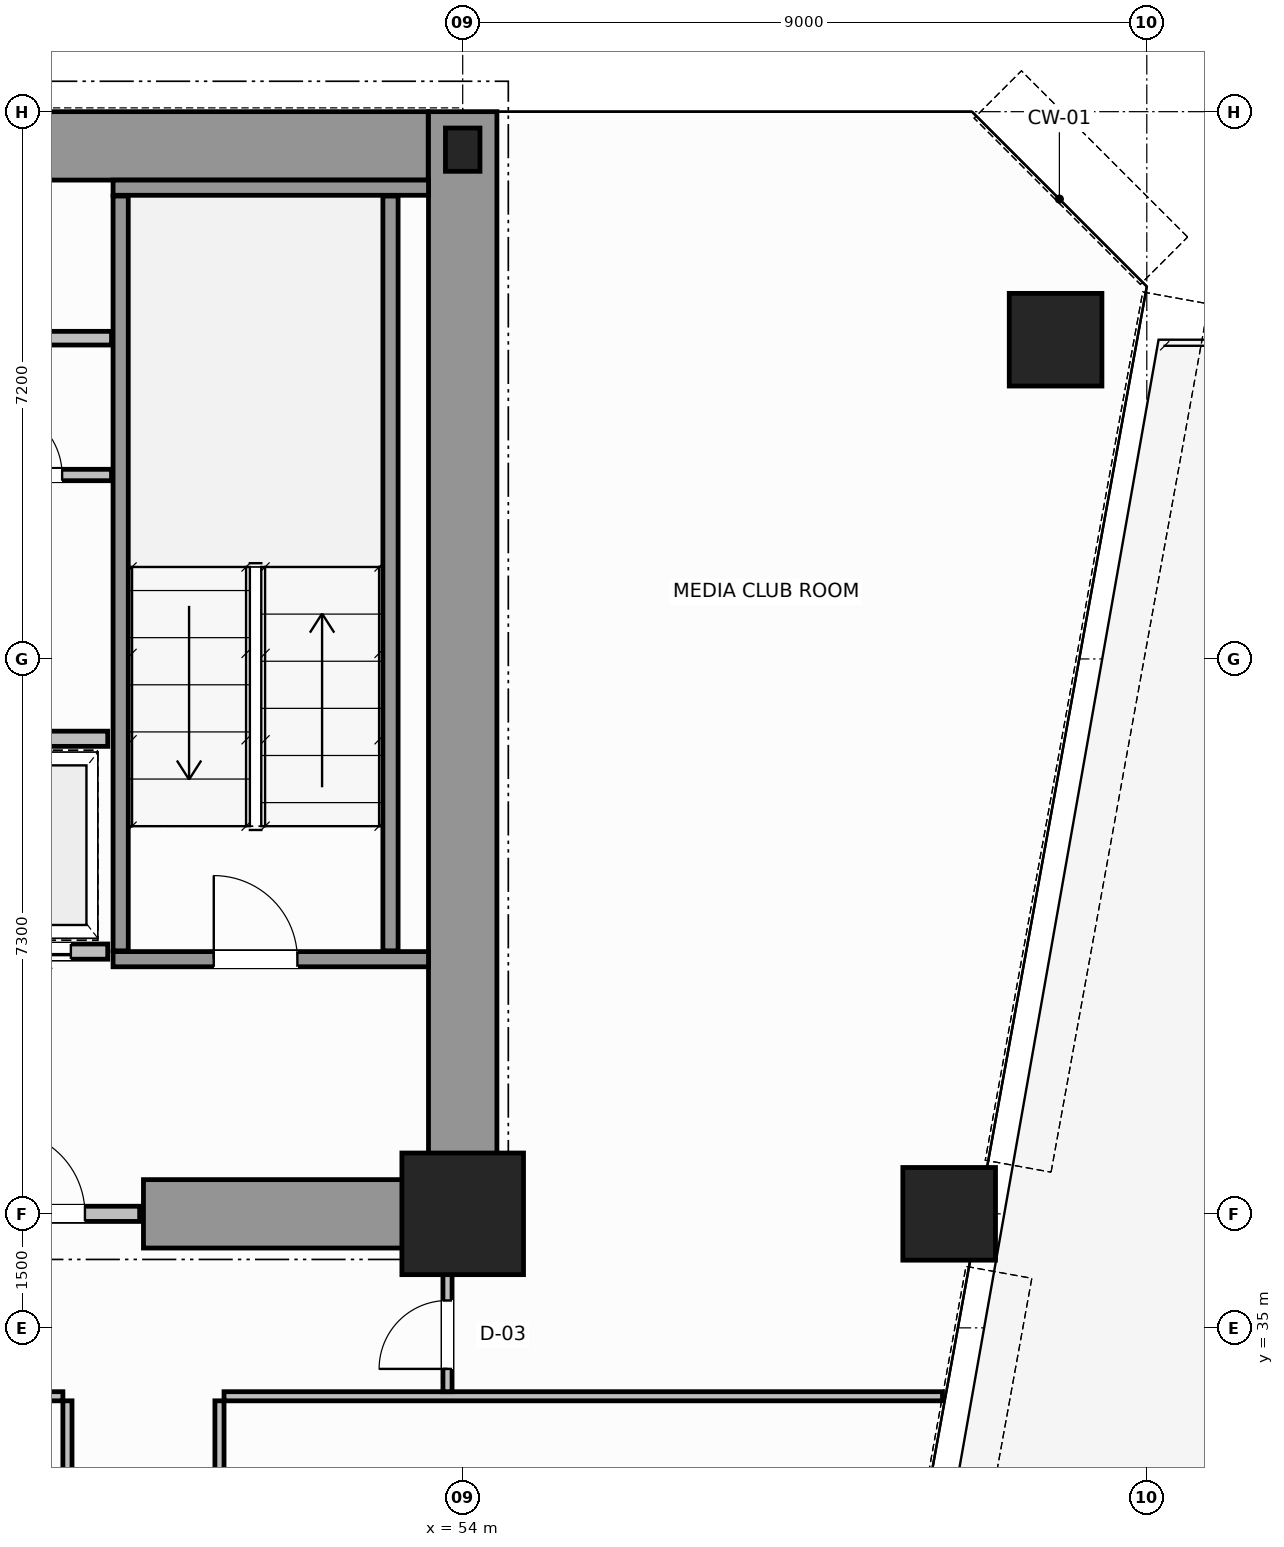
"""IFC4 building model, lengths in metres.
Left out: names, types, materials, properties, quantities, classifications, styles, units other than length and angle.
Written with IfcOpenShell. Run it as: python <this file> out.ifc"""

import sys

from ifc_helpers import new_model, si_unit, direction, frame, frame_2d, origin, origin_2d, place, context, subcontext, project, spatial, rectangle, hollow_circle, i_section, extrude, source, transform, mapped, element, fill, save


model = new_model("IFC4")
c1 = context("Model", 3, precision=1e-05, world=origin(), true_north=direction((0.0, 1.0)))
c2 = subcontext(c1, "Body", "Model", "MODEL_VIEW")
j1 = project(units=[si_unit("LENGTHUNIT", "METRE"), si_unit("PLANEANGLEUNIT", "RADIAN")], contexts=[c1])
p1 = place(None, origin())
s1 = spatial("IfcSite", under=j1, at=p1, CompositionType="ELEMENT")
p2 = place(p1, origin())
s2 = spatial("IfcBuilding", under=s1, at=p2, CompositionType="ELEMENT")
p3 = place(p2, frame((0.0, 0.0, 18.8)))
s3 = spatial("IfcBuildingStorey", under=s2, at=p3, CompositionType="ELEMENT", Elevation=18.8)
m1 = source(origin(), c2, "Body", "SweptSolid", [
    extrude(rectangle(XDim=1.6, YDim=1.6, at=origin_2d()), origin(), (0.0, 0.0, 1.0), 3.8),
])
p4 = place(p3, frame((54.0, 36.5, 0.0), z_axis=(0.0, 0.0, 1.0), x_axis=(1.0, 0.0, 0.0)))
e1 = element("IfcColumn", 1, at=p4, inside=s3, PredefinedType="COLUMN", context=c2, shape_type="MappedRepresentation", body=[
    mapped(m1, transform((0.0, 0.0, 0.0), scale=1.0)),
])
m2 = source(origin(), c2, "Body", "SweptSolid", [
    extrude(i_section(OverallWidth=0.454, OverallDepth=0.569, WebThickness=0.078, FlangeThickness=0.08, FilletRadius=0.015, at=origin_2d()), origin(), (0.0, 0.0, 1.0), 3.8),
])
p5 = place(p3, frame((54.0, 50.5, 0.0), z_axis=(0.0, 0.0, 1.0), x_axis=(1.0, 0.0, 0.0)))
e2 = element("IfcColumn", 2, at=p5, inside=s3, PredefinedType="COLUMN", context=c2, shape_type="MappedRepresentation", body=[
    mapped(m2, transform((0.0, 0.0, 0.0), scale=1.0)),
])
m3 = source(origin(), c2, "Body", "SweptSolid", [
    extrude(hollow_circle(Radius=0.61, WallThickness=0.05, at=origin_2d()), origin(), (0.0, 0.0, 1.0), 3.8),
])
for number, where, z_axis, x_axis in (
    (3, (61.8, 48.0, 0.0), (0.0, 0.0, 1.0), (1.0, 0.0, 0.0)),
    (4, (60.4, 36.5, 0.0), (0.0, 0.0, 1.0), (1.0, 0.0, 0.0)),
):
    element("IfcColumn", number, at=place(p3, frame(where, z_axis=z_axis, x_axis=x_axis)), inside=s3, PredefinedType="COLUMN", context=c2, shape_type="MappedRepresentation", body=[
        mapped(m3, transform((0.0, 0.0, 0.0), scale=1.0)),
    ])
p6 = place(p3, frame((34.002, 50.55, 0.0), z_axis=(0.0, 0.0, 1.0), x_axis=(1.0, 0.0, 0.0)))
e5 = element("IfcWall", 5, at=p6, inside=s3, PredefinedType="SHEAR", context=c2, shape_type="SweptSolid", body=[
    extrude(rectangle(XDim=19.544, YDim=0.9, at=frame_2d((9.772, 0.0))), origin(), (0.0, 0.0, 1.0), 3.8),
])
p7 = place(p3, frame((54.0, 36.5, 0.0), z_axis=(0.0, 0.0, 1.0), x_axis=(0.0, 1.0, 0.0)))
e6 = element("IfcWall", 6, at=p7, inside=s3, PredefinedType="SHEAR", context=c2, shape_type="SweptSolid", body=[
    extrude(rectangle(XDim=14.5, YDim=0.9, at=frame_2d((7.25, 0.0))), origin(), (0.0, 0.0, 1.0), 3.8),
])
p8 = place(p3, frame((49.8, 36.5, 0.0), z_axis=(0.0, 0.0, 1.0), x_axis=(1.0, 0.0, 0.0)))
e7 = element("IfcWall", 7, at=p8, inside=s3, PredefinedType="SHEAR", context=c2, shape_type="SweptSolid", body=[
    extrude(rectangle(XDim=3.73, YDim=0.9, at=frame_2d((1.865, 0.0))), origin(), (0.0, 0.0, 1.0), 2.38),
])
p9 = place(p3, frame((49.4, 39.85, 0.0), z_axis=(0.0, 0.0, 1.0), x_axis=(1.0, 0.0, 0.0)))
e8 = element("IfcWall", 8, at=p9, inside=s3, PredefinedType="SOLIDWALL", context=c2, shape_type="SweptSolid", body=[
    extrude(rectangle(XDim=4.15, YDim=0.2, at=frame_2d((2.075, 0.0))), origin(), (0.0, 0.0, 1.0), 3.8),
])
p10 = place(p9, frame((1.325, 0.0, 0.0)))
e9 = element("IfcOpeningElement", 9, at=p10, cuts=e8, PredefinedType="OPENING", context=c2, shape_type="SweptSolid", body=[
    extrude(rectangle(XDim=1.1, YDim=2.15, at=frame_2d((0.55, 1.075))), frame((0.0, 0.11, 0.0), z_axis=(0.0, -1.0, 0.0), x_axis=(1.0, 0.0, 0.0)), (0.0, 0.0, 1.0), 0.22),
])
p11 = place(p3, frame((49.4, 50.0, 0.0), z_axis=(0.0, 0.0, 1.0), x_axis=(1.0, 0.0, 0.0)))
e10 = element("IfcWall", 10, at=p11, inside=s3, PredefinedType="SOLIDWALL", context=c2, shape_type="SweptSolid", body=[
    extrude(rectangle(XDim=4.15, YDim=0.2, at=frame_2d((2.075, 0.0))), origin(), (0.0, 0.0, 1.0), 3.8),
])
for number, where, z_axis, x_axis in (
    (11, (49.5, 39.96, 0.0), (0.0, 0.0, 1.0), (0.0, 1.0, 0.0)),
    (12, (53.05, 39.96, 0.0), (0.0, 0.0, 1.0), (0.0, 1.0, 0.0)),
):
    element("IfcWall", number, at=place(p3, frame(where, z_axis=z_axis, x_axis=x_axis)), inside=s3, PredefinedType="SOLIDWALL", context=c2, shape_type="SweptSolid", body=[
        extrude(rectangle(XDim=9.93, YDim=0.2, at=frame_2d((4.965, 0.0))), origin(), (0.0, 0.0, 1.0), 3.8),
    ])
p12 = place(p3, frame((47.28, 36.5, 0.0), z_axis=(0.0, 0.0, 1.0), x_axis=(1.0, 0.0, 0.0)))
e13 = element("IfcWall", 13, at=p12, inside=s3, PredefinedType="SOLIDWALL", context=c2, shape_type="SweptSolid", body=[
    extrude(rectangle(XDim=2.47, YDim=0.2, at=frame_2d((1.235, 0.0))), origin(), (0.0, 0.0, 1.0), 2.37),
])
p13 = place(p12, frame((0.65, 0.0, 0.0)))
e14 = element("IfcOpeningElement", 14, at=p13, cuts=e13, PredefinedType="OPENING", context=c2, shape_type="SweptSolid", body=[
    extrude(rectangle(XDim=1.1, YDim=2.15, at=frame_2d((0.55, 1.075))), frame((0.0, 0.11, 0.0), z_axis=(0.0, -1.0, 0.0), x_axis=(1.0, 0.0, 0.0)), (0.0, 0.0, 1.0), 0.22),
])
p14 = place(p3, frame((47.26, 39.95, 0.0), z_axis=(0.0, 0.0, 1.0), x_axis=(1.0, 0.0, 0.0)))
e15 = element("IfcWall", 15, at=p14, inside=s3, PredefinedType="SOLIDWALL", context=c2, shape_type="SweptSolid", body=[
    extrude(rectangle(XDim=2.07, YDim=0.2, at=frame_2d((1.035, 0.0))), origin(), (0.0, 0.0, 1.0), 3.58),
])
p15 = place(p14, frame((0.485, 0.0, 0.0)))
e16 = element("IfcOpeningElement", 16, at=p15, cuts=e15, PredefinedType="OPENING", context=c2, shape_type="SweptSolid", body=[
    extrude(rectangle(XDim=1.1, YDim=2.15, at=frame_2d((0.55, 1.075))), frame((0.0, 0.11, 0.0), z_axis=(0.0, -1.0, 0.0), x_axis=(1.0, 0.0, 0.0)), (0.0, 0.0, 1.0), 0.22),
])
p16 = place(p3, frame((47.26, 42.75, 0.0), z_axis=(0.0, 0.0, 1.0), x_axis=(1.0, 0.0, 0.0)))
e17 = element("IfcWall", 17, at=p16, inside=s3, PredefinedType="SOLIDWALL", context=c2, shape_type="SweptSolid", body=[
    extrude(rectangle(XDim=2.07, YDim=0.2, at=frame_2d((1.035, 0.0))), origin(), (0.0, 0.0, 1.0), 3.58),
])
p17 = place(p3, frame((47.28, 46.22, 0.0), z_axis=(0.0, 0.0, 1.0), x_axis=(1.0, 0.0, 0.0)))
e18 = element("IfcWall", 18, at=p17, inside=s3, PredefinedType="PARTITIONING", context=c2, shape_type="SweptSolid", body=[
    extrude(rectangle(XDim=2.1, YDim=0.15, at=frame_2d((1.05, 0.0))), origin(), (0.0, 0.0, 1.0), 3.58),
])
p18 = place(p17, frame((0.55, 0.0, 0.0)))
e19 = element("IfcOpeningElement", 19, at=p18, cuts=e18, PredefinedType="OPENING", context=c2, shape_type="SweptSolid", body=[
    extrude(rectangle(XDim=0.9, YDim=2.1, at=frame_2d((0.45, 1.05))), frame((0.0, 0.085, 0.0), z_axis=(0.0, -1.0, 0.0), x_axis=(1.0, 0.0, 0.0)), (0.0, 0.0, 1.0), 0.17),
])
p19 = place(p3, frame((18.62, 48.02, 0.0), z_axis=(0.0, 0.0, 1.0), x_axis=(1.0, 0.0, 0.0)))
e20 = element("IfcWall", 20, at=p19, inside=s3, PredefinedType="PLUMBINGWALL", context=c2, shape_type="SweptSolid", body=[
    extrude(rectangle(XDim=30.76, YDim=0.18, at=frame_2d((15.38, 0.0))), origin(), (0.0, 0.0, 1.0), 3.58),
])
p20 = place(p19, frame((1.655, 0.0, 0.0)))
e21 = element("IfcOpeningElement", 21, at=p20, cuts=e20, PredefinedType="OPENING", context=c2, shape_type="SweptSolid", body=[
    extrude(rectangle(XDim=0.9, YDim=2.15, at=frame_2d((0.45, 1.075))), frame((0.0, 0.1, 0.0), z_axis=(0.0, -1.0, 0.0), x_axis=(1.0, 0.0, 0.0)), (0.0, 0.0, 1.0), 0.2),
])
p21 = place(p19, frame((6.03, 0.0, 0.0)))
e22 = element("IfcOpeningElement", 22, at=p21, cuts=e20, PredefinedType="OPENING", context=c2, shape_type="SweptSolid", body=[
    extrude(rectangle(XDim=0.9, YDim=2.15, at=frame_2d((0.45, 1.075))), frame((0.0, 0.1, 0.0), z_axis=(0.0, -1.0, 0.0), x_axis=(1.0, 0.0, 0.0)), (0.0, 0.0, 1.0), 0.2),
])
p22 = place(p19, frame((10.93, 0.0, 0.0)))
e23 = element("IfcOpeningElement", 23, at=p22, cuts=e20, PredefinedType="OPENING", context=c2, shape_type="SweptSolid", body=[
    extrude(rectangle(XDim=0.9, YDim=2.15, at=frame_2d((0.45, 1.075))), frame((0.0, 0.1, 0.0), z_axis=(0.0, -1.0, 0.0), x_axis=(1.0, 0.0, 0.0)), (0.0, 0.0, 1.0), 0.2),
])
p23 = place(p19, frame((16.13, 0.0, 0.0)))
e24 = element("IfcOpeningElement", 24, at=p23, cuts=e20, PredefinedType="OPENING", context=c2, shape_type="SweptSolid", body=[
    extrude(rectangle(XDim=0.9, YDim=2.15, at=frame_2d((0.45, 1.075))), frame((0.0, 0.1, 0.0), z_axis=(0.0, -1.0, 0.0), x_axis=(1.0, 0.0, 0.0)), (0.0, 0.0, 1.0), 0.2),
])
p24 = place(p19, frame((21.73, 0.0, 0.0)))
e25 = element("IfcOpeningElement", 25, at=p24, cuts=e20, PredefinedType="OPENING", context=c2, shape_type="SweptSolid", body=[
    extrude(rectangle(XDim=0.9, YDim=2.15, at=frame_2d((0.45, 1.075))), frame((0.0, 0.1, 0.0), z_axis=(0.0, -1.0, 0.0), x_axis=(1.0, 0.0, 0.0)), (0.0, 0.0, 1.0), 0.2),
])
p25 = place(p19, frame((27.505, 0.0, 0.0)))
e26 = element("IfcOpeningElement", 26, at=p25, cuts=e20, PredefinedType="OPENING", context=c2, shape_type="SweptSolid", body=[
    extrude(rectangle(XDim=0.9, YDim=2.15, at=frame_2d((0.45, 1.075))), frame((0.0, 0.1, 0.0), z_axis=(0.0, -1.0, 0.0), x_axis=(1.0, 0.0, 0.0)), (0.0, 0.0, 1.0), 0.2),
])
p26 = place(p3, frame((19.26, 34.1, 0.0), z_axis=(0.0, 0.0, 1.0), x_axis=(1.0, 0.0, 0.0)))
e27 = element("IfcWall", 27, at=p26, inside=s3, PredefinedType="PARTITIONING", context=c2, shape_type="SweptSolid", body=[
    extrude(rectangle(XDim=29.48, YDim=0.12, at=frame_2d((14.74, 0.0))), origin(), (0.0, 0.0, 1.0), 3.58),
])
p27 = place(p26, frame((1.49, 0.0, 0.0)))
e28 = element("IfcOpeningElement", 28, at=p27, cuts=e27, PredefinedType="OPENING", context=c2, shape_type="SweptSolid", body=[
    extrude(rectangle(XDim=0.9, YDim=2.15, at=frame_2d((0.45, 1.075))), frame((0.0, 0.07, 0.0), z_axis=(0.0, -1.0, 0.0), x_axis=(1.0, 0.0, 0.0)), (0.0, 0.0, 1.0), 0.14),
])
p28 = place(p26, frame((9.79, 0.0, 0.0)))
e29 = element("IfcOpeningElement", 29, at=p28, cuts=e27, PredefinedType="OPENING", context=c2, shape_type="SweptSolid", body=[
    extrude(rectangle(XDim=0.9, YDim=2.15, at=frame_2d((0.45, 1.075))), frame((0.0, 0.07, 0.0), z_axis=(0.0, -1.0, 0.0), x_axis=(1.0, 0.0, 0.0)), (0.0, 0.0, 1.0), 0.14),
])
p29 = place(p26, frame((22.59, 0.0, 0.0)))
e30 = element("IfcOpeningElement", 30, at=p29, cuts=e27, PredefinedType="OPENING", context=c2, shape_type="SweptSolid", body=[
    extrude(rectangle(XDim=0.9, YDim=2.15, at=frame_2d((0.45, 1.075))), frame((0.0, 0.07, 0.0), z_axis=(0.0, -1.0, 0.0), x_axis=(1.0, 0.0, 0.0)), (0.0, 0.0, 1.0), 0.14),
])
p30 = place(p3, frame((50.86, 34.1, 0.0), z_axis=(0.0, 0.0, 1.0), x_axis=(1.0, 0.0, 0.0)))
e31 = element("IfcWall", 31, at=p30, inside=s3, PredefinedType="PARTITIONING", context=c2, shape_type="SweptSolid", body=[
    extrude(rectangle(XDim=9.452, YDim=0.12, at=frame_2d((4.726, 0.0))), origin(), (0.0, 0.0, 1.0), 3.58),
])
p31 = place(p3, frame((53.8, 34.16, 0.0), z_axis=(0.0, 0.0, 1.0), x_axis=(0.0, 1.0, 0.0)))
e32 = element("IfcWall", 32, at=p31, inside=s3, PredefinedType="PARTITIONING", context=c2, shape_type="SweptSolid", body=[
    extrude(rectangle(XDim=2.28, YDim=0.12, at=frame_2d((1.14, 0.0))), origin(), (0.0, 0.0, 1.0), 3.58),
])
p32 = place(p31, frame((0.3, 0.0, 0.0)))
e33 = element("IfcOpeningElement", 33, at=p32, cuts=e32, PredefinedType="OPENING", context=c2, shape_type="SweptSolid", body=[
    extrude(rectangle(XDim=0.9, YDim=2.15, at=frame_2d((0.45, 1.075))), frame((0.0, 0.07, 0.0), z_axis=(0.0, -1.0, 0.0), x_axis=(1.0, 0.0, 0.0)), (0.0, 0.0, 1.0), 0.14),
])
p33 = place(p3, frame((48.8, 12.8, 0.0), z_axis=(0.0, 0.0, 1.0), x_axis=(0.0, 1.0, 0.0)))
e34 = element("IfcWall", 34, at=p33, inside=s3, PredefinedType="PARTITIONING", context=c2, shape_type="SweptSolid", body=[
    extrude(rectangle(XDim=21.24, YDim=0.12, at=frame_2d((10.62, 0.0))), origin(), (0.0, 0.0, 1.0), 3.58),
])
p34 = place(p3, frame((50.8, 12.8, 0.0), z_axis=(0.0, 0.0, 1.0), x_axis=(0.0, 1.0, 0.0)))
e35 = element("IfcWall", 35, at=p34, inside=s3, PredefinedType="PARTITIONING", context=c2, shape_type="SweptSolid", body=[
    extrude(rectangle(XDim=21.24, YDim=0.12, at=frame_2d((10.62, 0.0))), origin(), (0.0, 0.0, 1.0), 3.58),
])
p35 = place(p34, frame((3.45, 0.0, 0.0)))
e36 = element("IfcOpeningElement", 36, at=p35, cuts=e35, PredefinedType="OPENING", context=c2, shape_type="SweptSolid", body=[
    extrude(rectangle(XDim=0.9, YDim=2.15, at=frame_2d((0.45, 1.075))), frame((0.0, 0.07, 0.0), z_axis=(0.0, -1.0, 0.0), x_axis=(1.0, 0.0, 0.0)), (0.0, 0.0, 1.0), 0.14),
])
p36 = place(p34, frame((11.95, 0.0, 0.0)))
e37 = element("IfcOpeningElement", 37, at=p36, cuts=e35, PredefinedType="OPENING", context=c2, shape_type="SweptSolid", body=[
    extrude(rectangle(XDim=0.9, YDim=2.15, at=frame_2d((0.45, 1.075))), frame((0.0, 0.07, 0.0), z_axis=(0.0, -1.0, 0.0), x_axis=(1.0, 0.0, 0.0)), (0.0, 0.0, 1.0), 0.14),
])
p37 = place(p34, frame((18.67, 0.0, 0.0)))
e38 = element("IfcOpeningElement", 38, at=p37, cuts=e35, PredefinedType="OPENING", context=c2, shape_type="SweptSolid", body=[
    extrude(rectangle(XDim=0.9, YDim=2.15, at=frame_2d((0.45, 1.075))), frame((0.0, 0.07, 0.0), z_axis=(0.0, -1.0, 0.0), x_axis=(1.0, 0.0, 0.0)), (0.0, 0.0, 1.0), 0.14),
])
m4 = source(origin(), c2, "Body", "SweptSolid", [
    extrude(rectangle(XDim=1.1, YDim=2.15, at=frame_2d((0.55, 1.075))), frame((0.0, 0.025, 0.0), z_axis=(0.0, -1.0, 0.0), x_axis=(1.0, 0.0, 0.0)), (0.0, 0.0, 1.0), 0.05),
])
p38 = place(p10, origin())
e39 = element("IfcDoor", 39, at=p38, inside=s3, OperationType="SINGLE_SWING_RIGHT", PredefinedType="DOOR", context=c2, shape_type="MappedRepresentation", body=[
    mapped(m4, transform((0.0, 0.0, 0.0), scale=1.0)),
])
fill(e9, e39)
p39 = place(p13, origin())
e40 = element("IfcDoor", 40, at=p39, inside=s3, OperationType="SINGLE_SWING_LEFT", PredefinedType="DOOR", context=c2, shape_type="MappedRepresentation", body=[
    mapped(m4, transform((0.0, 0.0, 0.0), scale=1.0)),
])
fill(e14, e40)
p40 = place(p15, origin())
e41 = element("IfcDoor", 41, at=p40, inside=s3, OperationType="DOUBLE_DOOR_SLIDING", PredefinedType="DOOR", context=c2, shape_type="MappedRepresentation", body=[
    mapped(m4, transform((0.0, 0.0, 0.0), scale=1.0)),
])
fill(e16, e41)
m5 = source(origin(), c2, "Body", "SweptSolid", [
    extrude(rectangle(XDim=0.9, YDim=2.1, at=frame_2d((0.45, 1.05))), frame((0.0, 0.025, 0.0), z_axis=(0.0, -1.0, 0.0), x_axis=(1.0, 0.0, 0.0)), (0.0, 0.0, 1.0), 0.05),
])
p41 = place(p18, origin())
e42 = element("IfcDoor", 42, at=p41, inside=s3, OperationType="SINGLE_SWING_RIGHT", PredefinedType="DOOR", context=c2, shape_type="MappedRepresentation", body=[
    mapped(m5, transform((0.0, 0.0, 0.0), scale=1.0)),
])
fill(e19, e42)
m6 = source(origin(), c2, "Body", "SweptSolid", [
    extrude(rectangle(XDim=0.9, YDim=2.15, at=frame_2d((0.45, 1.075))), frame((0.0, 0.025, 0.0), z_axis=(0.0, -1.0, 0.0), x_axis=(1.0, 0.0, 0.0)), (0.0, 0.0, 1.0), 0.05),
])
p42 = place(p32, origin())
e43 = element("IfcDoor", 43, at=p42, inside=s3, OperationType="SINGLE_SWING_RIGHT", PredefinedType="DOOR", context=c2, shape_type="MappedRepresentation", body=[
    mapped(m6, transform((0.0, 0.0, 0.0), scale=1.0)),
])
fill(e33, e43)
save(model, sys.argv[1])
